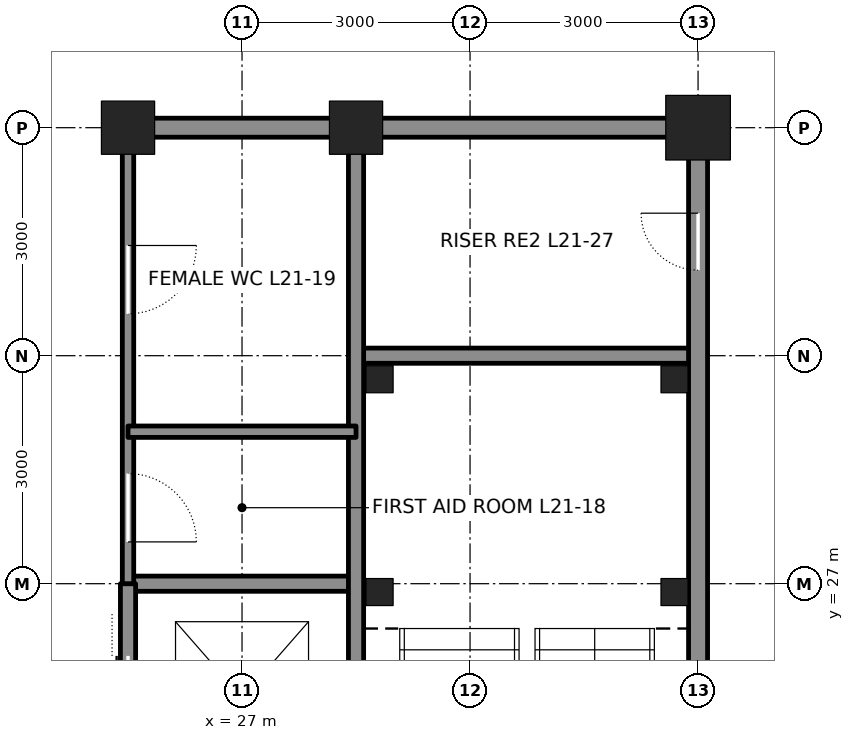
"""IFC4 building model, lengths in metres.
Left out: names, types, materials, properties, quantities, classifications, styles, units other than length and angle.
Written with IfcOpenShell. Run it as: python <this file> out.ifc"""

import sys

from ifc_helpers import new_model, si_unit, direction, frame, frame_2d, origin, origin_2d, place, context, subcontext, project, spatial, rectangle, hollow_rectangle, extrude, element, fill, save


model = new_model("IFC4")
c1 = context("Model", 3, precision=1e-05, world=origin(), true_north=direction((0.0, 1.0)))
c2 = subcontext(c1, "Body", "Model", "MODEL_VIEW")
j1 = project(units=[si_unit("LENGTHUNIT", "METRE"), si_unit("PLANEANGLEUNIT", "RADIAN")], contexts=[c1])
p1 = place(None, origin())
s1 = spatial("IfcSite", under=j1, at=p1, CompositionType="ELEMENT")
p2 = place(p1, origin())
s2 = spatial("IfcBuilding", under=s1, at=p2, CompositionType="ELEMENT")
p3 = place(p2, frame((0.0, 0.0, 102.3)))
s3 = spatial("IfcBuildingStorey", under=s2, at=p3, CompositionType="ELEMENT", Elevation=102.3)
for number, where, z_axis, x_axis in (
    (1, (25.5, 33.0, 0.0), (0.0, 0.0, 1.0), (1.0, 0.0, 0.0)),
    (2, (28.5, 33.0, 0.0), (0.0, 0.0, 1.0), (1.0, 0.0, 0.0)),
):
    element("IfcColumn", number, at=place(p3, frame(where, z_axis=z_axis, x_axis=x_axis)), inside=s3, PredefinedType="COLUMN", context=c2, shape_type="SweptSolid", body=[
        extrude(hollow_rectangle(XDim=0.7, YDim=0.7, WallThickness=0.07, at=origin_2d()), origin(), (0.0, 0.0, 1.0), 4.5),
    ])
p4 = place(p3, frame((33.0, 33.0, 0.0), z_axis=(0.0, 0.0, 1.0), x_axis=(1.0, 0.0, 0.0)))
e3 = element("IfcColumn", 3, at=p4, inside=s3, PredefinedType="COLUMN", context=c2, shape_type="SweptSolid", body=[
    extrude(hollow_rectangle(XDim=0.85, YDim=0.85, WallThickness=0.085, at=origin_2d()), origin(), (0.0, 0.0, 1.0), 4.5),
])
p5 = place(p3, frame((25.5, 27.0, 0.0), z_axis=(0.0, 0.0, 1.0), x_axis=(1.0, 0.0, 0.0)))
e4 = element("IfcWall", 4, at=p5, inside=s3, PredefinedType="SOLIDWALL", context=c2, shape_type="SweptSolid", body=[
    extrude(rectangle(XDim=3.0, YDim=0.2, at=frame_2d((1.5, 0.0))), origin(), (0.0, 0.0, 1.0), 4.34),
])
p6 = place(p3, frame((28.5, 30.0, 0.0), z_axis=(0.0, 0.0, 1.0), x_axis=(1.0, 0.0, 0.0)))
e5 = element("IfcWall", 5, at=p6, inside=s3, PredefinedType="SOLIDWALL", context=c2, shape_type="SweptSolid", body=[
    extrude(rectangle(XDim=4.5, YDim=0.2, at=frame_2d((2.25, 0.0))), origin(), (0.0, 0.0, 1.0), 4.34),
])
p7 = place(p3, frame((25.75, 33.0, 0.0), z_axis=(0.0, 0.0, 1.0), x_axis=(1.0, 0.0, 0.0)))
e6 = element("IfcWall", 6, at=p7, inside=s3, PredefinedType="SOLIDWALL", context=c2, shape_type="SweptSolid", body=[
    extrude(rectangle(XDim=2.5, YDim=0.25, at=frame_2d((1.25, 0.0))), origin(), (0.0, 0.0, 1.0), 3.481),
])
p8 = place(p3, frame((28.75, 33.0, 0.0), z_axis=(0.0, 0.0, 1.0), x_axis=(1.0, 0.0, 0.0)))
e7 = element("IfcWall", 7, at=p8, inside=s3, PredefinedType="SOLIDWALL", context=c2, shape_type="SweptSolid", body=[
    extrude(rectangle(XDim=4.0, YDim=0.25, at=frame_2d((2.0, 0.0))), origin(), (0.0, 0.0, 1.0), 3.481),
])
p9 = place(p3, frame((25.5, 15.0, 0.0), z_axis=(0.0, 0.0, 1.0), x_axis=(0.0, 1.0, 0.0)))
e8 = element("IfcWall", 8, at=p9, inside=s3, PredefinedType="SOLIDWALL", context=c2, shape_type="SweptSolid", body=[
    extrude(rectangle(XDim=12.0, YDim=0.2, at=frame_2d((6.0, 0.0))), origin(), (0.0, 0.0, 1.0), 3.365),
])
p10 = place(p9, frame((0.95, 0.0, 0.0)))
e9 = element("IfcOpeningElement", 9, at=p10, cuts=e8, PredefinedType="OPENING", context=c2, shape_type="SweptSolid", body=[
    extrude(rectangle(XDim=1.1, YDim=2.1, at=frame_2d((0.55, 1.05))), frame((0.0, 0.11, 0.0), z_axis=(0.0, -1.0, 0.0), x_axis=(1.0, 0.0, 0.0)), (0.0, 0.0, 1.0), 0.22),
])
p11 = place(p9, frame((3.95, 0.0, 0.0)))
e10 = element("IfcOpeningElement", 10, at=p11, cuts=e8, PredefinedType="OPENING", context=c2, shape_type="SweptSolid", body=[
    extrude(rectangle(XDim=1.1, YDim=2.1, at=frame_2d((0.55, 1.05))), frame((0.0, 0.11, 0.0), z_axis=(0.0, -1.0, 0.0), x_axis=(1.0, 0.0, 0.0)), (0.0, 0.0, 1.0), 0.22),
])
p12 = place(p9, frame((6.95, 0.0, 0.0)))
e11 = element("IfcOpeningElement", 11, at=p12, cuts=e8, PredefinedType="OPENING", context=c2, shape_type="SweptSolid", body=[
    extrude(rectangle(XDim=1.1, YDim=2.1, at=frame_2d((0.55, 1.05))), frame((0.0, 0.11, 0.0), z_axis=(0.0, -1.0, 0.0), x_axis=(1.0, 0.0, 0.0)), (0.0, 0.0, 1.0), 0.22),
])
p13 = place(p9, frame((9.95, 0.0, 0.0)))
e12 = element("IfcOpeningElement", 12, at=p13, cuts=e8, PredefinedType="OPENING", context=c2, shape_type="SweptSolid", body=[
    extrude(rectangle(XDim=1.1, YDim=2.1, at=frame_2d((0.55, 1.05))), frame((0.0, 0.11, 0.0), z_axis=(0.0, -1.0, 0.0), x_axis=(1.0, 0.0, 0.0)), (0.0, 0.0, 1.0), 0.22),
])
p14 = place(p3, frame((25.5, 27.0, 0.0), z_axis=(0.0, 0.0, 1.0), x_axis=(0.0, 1.0, 0.0)))
e13 = element("IfcWall", 13, at=p14, inside=s3, PredefinedType="PARTITIONING", context=c2, shape_type="SweptSolid", body=[
    extrude(rectangle(XDim=5.75, YDim=0.15, at=frame_2d((2.875, 0.0))), origin(), (0.0, 0.0, 1.0), 3.365),
])
p15 = place(p14, frame((0.55, 0.0, 0.0)))
e14 = element("IfcOpeningElement", 14, at=p15, cuts=e13, PredefinedType="OPENING", context=c2, shape_type="SweptSolid", body=[
    extrude(rectangle(XDim=0.9, YDim=2.1, at=frame_2d((0.45, 1.05))), frame((0.0, 0.085, 0.0), z_axis=(0.0, -1.0, 0.0), x_axis=(1.0, 0.0, 0.0)), (0.0, 0.0, 1.0), 0.17),
])
p16 = place(p14, frame((3.55, 0.0, 0.0)))
e15 = element("IfcOpeningElement", 15, at=p16, cuts=e13, PredefinedType="OPENING", context=c2, shape_type="SweptSolid", body=[
    extrude(rectangle(XDim=0.9, YDim=2.1, at=frame_2d((0.45, 1.05))), frame((0.0, 0.085, 0.0), z_axis=(0.0, -1.0, 0.0), x_axis=(1.0, 0.0, 0.0)), (0.0, 0.0, 1.0), 0.17),
])
p17 = place(p3, frame((28.5, 24.25, 0.0), z_axis=(0.0, 0.0, 1.0), x_axis=(0.0, 1.0, 0.0)))
e16 = element("IfcWall", 16, at=p17, inside=s3, PredefinedType="SOLIDWALL", context=c2, shape_type="SweptSolid", body=[
    extrude(rectangle(XDim=8.5, YDim=0.2, at=frame_2d((4.25, 0.0))), origin(), (0.0, 0.0, 1.0), 3.413),
])
p18 = place(p3, frame((33.0, 24.25, 0.0), z_axis=(0.0, 0.0, 1.0), x_axis=(0.0, 1.0, 0.0)))
e17 = element("IfcWall", 17, at=p18, inside=s3, PredefinedType="SOLIDWALL", context=c2, shape_type="SweptSolid", body=[
    extrude(rectangle(XDim=8.5, YDim=0.25, at=frame_2d((4.25, 0.0))), origin(), (0.0, 0.0, 1.0), 3.413),
])
p19 = place(p18, frame((6.875, 0.0, 0.0)))
e18 = element("IfcOpeningElement", 18, at=p19, cuts=e17, PredefinedType="OPENING", context=c2, shape_type="SweptSolid", body=[
    extrude(rectangle(XDim=0.75, YDim=2.1, at=frame_2d((0.375, 1.05))), frame((0.0, 0.135, 0.0), z_axis=(0.0, -1.0, 0.0), x_axis=(1.0, 0.0, 0.0)), (0.0, 0.0, 1.0), 0.27),
])
p20 = place(p3, frame((25.5, 29.0, 0.0), z_axis=(0.0, 0.0, 1.0), x_axis=(1.0, 0.0, 0.0)))
e19 = element("IfcWall", 19, at=p20, inside=s3, PredefinedType="PARTITIONING", context=c2, shape_type="SweptSolid", body=[
    extrude(rectangle(XDim=3.0, YDim=0.15, at=frame_2d((1.5, 0.0))), origin(), (0.0, 0.0, 1.0), 4.34),
])
for number, where, z_axis, x_axis in (
    (20, (28.81, 29.69, 0.0), (0.0, 0.0, 1.0), (1.0, 0.0, 0.0)),
    (21, (32.69, 29.69, 0.0), (0.0, 0.0, 1.0), (1.0, 0.0, 0.0)),
    (22, (28.81, 26.89, 0.0), (0.0, 0.0, 1.0), (1.0, 0.0, 0.0)),
    (23, (32.69, 26.89, 0.0), (0.0, 0.0, 1.0), (1.0, 0.0, 0.0)),
):
    element("IfcColumn", number, at=place(p3, frame(where, z_axis=z_axis, x_axis=x_axis)), inside=s3, PredefinedType="COLUMN", context=c2, shape_type="SweptSolid", body=[
        extrude(hollow_rectangle(XDim=0.356, YDim=0.356, WallThickness=0.015, at=origin_2d()), origin(), (0.0, 0.0, 1.0), 4.5),
    ])
p21 = place(p19, origin())
e24 = element("IfcDoor", 24, at=p21, inside=s3, OperationType="SINGLE_SWING_RIGHT", PredefinedType="DOOR", context=c2, shape_type="SweptSolid", body=[
    extrude(rectangle(XDim=0.75, YDim=2.1, at=frame_2d((0.375, 1.05))), frame((0.0, 0.025, 0.0), z_axis=(0.0, -1.0, 0.0), x_axis=(1.0, 0.0, 0.0)), (0.0, 0.0, 1.0), 0.05),
])
fill(e18, e24)
p22 = place(p15, frame((0.9, 0.0, 0.0), z_axis=(0.0, 0.0, 1.0), x_axis=(-1.0, 0.0, 0.0)))
e25 = element("IfcDoor", 25, at=p22, inside=s3, OperationType="SINGLE_SWING_RIGHT", PredefinedType="DOOR", context=c2, shape_type="SweptSolid", body=[
    extrude(rectangle(XDim=0.9, YDim=2.1, at=frame_2d((0.45, 1.05))), frame((0.0, 0.025, 0.0), z_axis=(0.0, -1.0, 0.0), x_axis=(1.0, 0.0, 0.0)), (0.0, 0.0, 1.0), 0.05),
])
fill(e14, e25)
p23 = place(p16, frame((0.9, 0.0, 0.0), z_axis=(0.0, 0.0, 1.0), x_axis=(-1.0, 0.0, 0.0)))
e26 = element("IfcDoor", 26, at=p23, inside=s3, OperationType="SINGLE_SWING_LEFT", PredefinedType="DOOR", context=c2, shape_type="SweptSolid", body=[
    extrude(rectangle(XDim=0.9, YDim=2.1, at=frame_2d((0.45, 1.05))), frame((0.0, 0.025, 0.0), z_axis=(0.0, -1.0, 0.0), x_axis=(1.0, 0.0, 0.0)), (0.0, 0.0, 1.0), 0.05),
])
fill(e15, e26)
p24 = place(p13, origin())
e27 = element("IfcDoor", 27, at=p24, inside=s3, OperationType="DOUBLE_DOOR_SLIDING", PredefinedType="DOOR", context=c2, shape_type="SweptSolid", body=[
    extrude(rectangle(XDim=1.1, YDim=2.1, at=frame_2d((0.55, 1.05))), frame((0.0, 0.025, 0.0), z_axis=(0.0, -1.0, 0.0), x_axis=(1.0, 0.0, 0.0)), (0.0, 0.0, 1.0), 0.05),
])
fill(e12, e27)
save(model, sys.argv[1])
